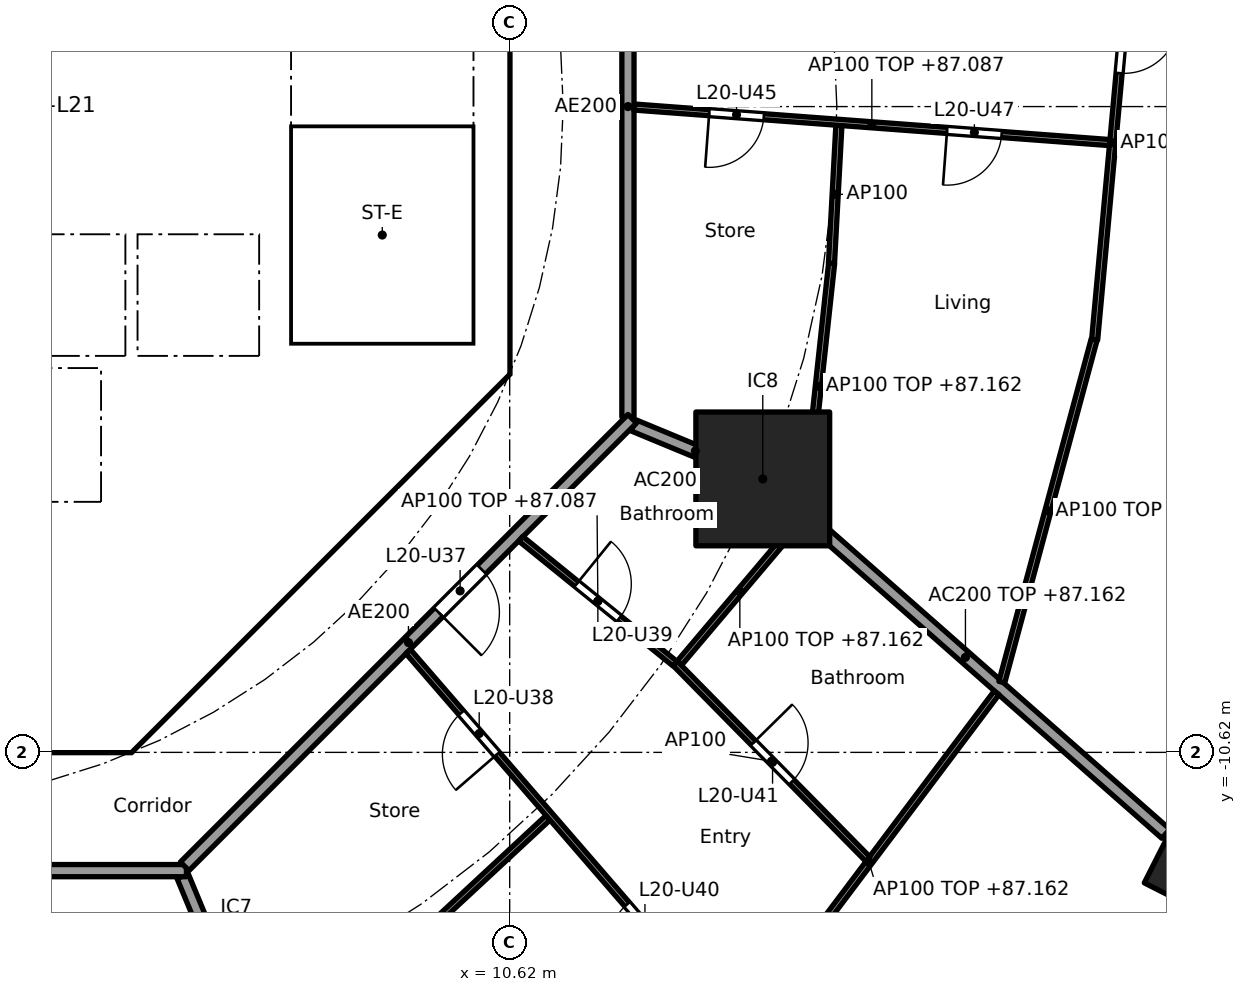
"""IFC4 building model, lengths in metres.
Left out: names, types, materials, properties, quantities, classifications, styles, units other than length and angle.
Written with IfcOpenShell. Run it as: python <this file> out.ifc"""

import sys

from ifc_helpers import new_model, si_unit, direction, frame, frame_2d, origin, origin_2d, place, context, subcontext, project, spatial, polyline, rectangle, hollow_rectangle, outline, extrude, element, fill, save


model = new_model("IFC4")
c1 = context("Model", 3, precision=1e-05, world=origin(), true_north=direction((0.0, 1.0)))
c2 = subcontext(c1, "Body", "Model", "MODEL_VIEW")
j1 = project(units=[si_unit("LENGTHUNIT", "METRE"), si_unit("PLANEANGLEUNIT", "RADIAN")], contexts=[c1])
p1 = place(None, origin())
s1 = spatial("IfcSite", under=j1, at=p1, CompositionType="ELEMENT")
p2 = place(p1, origin())
s2 = spatial("IfcBuilding", under=s1, at=p2, CompositionType="ELEMENT")
p3 = place(p2, frame((0.0, 0.0, 84.4)))
s3 = spatial("IfcBuildingStorey", under=s2, at=p3, CompositionType="ELEMENT", Elevation=84.4)
p4 = place(p3, frame((21.751, -12.39, 0.0), z_axis=(0.0, 0.0, 1.0), x_axis=(0.452462697578, 0.891783329795, 0.0)))
e1 = element("IfcColumn", 1, at=p4, inside=s3, PredefinedType="COLUMN", context=c2, shape_type="SweptSolid", body=[
    extrude(hollow_rectangle(XDim=1.3, YDim=0.9, WallThickness=0.045, at=origin_2d()), origin(), (0.0, 0.0, 1.0), 3.7),
])
p5 = place(p3, frame((14.782, -6.123, 0.0), z_axis=(0.0, 0.0, 1.0), x_axis=(1.0, 0.0, 0.0)))
e2 = element("IfcColumn", 2, at=p5, inside=s3, PredefinedType="COLUMN", context=c2, shape_type="SweptSolid", body=[
    extrude(rectangle(XDim=2.2, YDim=2.2, at=origin_2d()), origin(), (0.0, 0.0, 1.0), 3.7),
])
p6 = place(p3, frame((21.748, -13.137, 0.0), z_axis=(0.0, 0.0, 1.0), x_axis=(-0.506297921217, -0.862358634775, 0.0)))
e3 = element("IfcWall", 3, at=p6, inside=s3, PredefinedType="SOLIDWALL", context=c2, shape_type="SweptSolid", body=[
    extrude(rectangle(XDim=3.325, YDim=0.25, at=frame_2d((1.662, 0.0))), origin(), (0.0, 0.0, 1.0), 3.44),
])
p7 = place(p6, frame((0.612, 0.0, 0.0)))
e4 = element("IfcOpeningElement", 4, at=p7, cuts=e3, PredefinedType="OPENING", context=c2, shape_type="SweptSolid", body=[
    extrude(rectangle(XDim=2.1, YDim=2.4, at=frame_2d((1.05, 1.2))), frame((0.0, 0.135, 0.0), z_axis=(0.0, -1.0, 0.0), x_axis=(1.0, 0.0, 0.0)), (0.0, 0.0, 1.0), 0.27),
])
p8 = place(p3, frame((4.613, -9.988, 0.0), z_axis=(0.0, 0.0, 1.0), x_axis=(0.707106781187, 0.707106781187, 0.0)))
e5 = element("IfcWall", 5, at=p8, inside=s3, PredefinedType="SHEAR", context=c2, shape_type="SweptSolid", body=[
    extrude(rectangle(XDim=7.602, YDim=0.6, at=frame_2d((3.801, 0.0))), origin(), (0.0, 0.0, 1.0), 3.44),
])
p9 = place(p8, frame((3.201, 0.0, 0.0)))
e6 = element("IfcOpeningElement", 6, at=p9, cuts=e5, PredefinedType="OPENING", context=c2, shape_type="SweptSolid", body=[
    extrude(rectangle(XDim=1.2, YDim=2.1, at=frame_2d((0.6, 1.05))), frame((0.0, 0.31, 0.0), z_axis=(0.0, -1.0, 0.0), x_axis=(1.0, 0.0, 0.0)), (0.0, 0.0, 1.0), 0.62),
])
p10 = place(p3, frame((4.0, -10.025, 0.0), z_axis=(0.0, 0.0, 1.0), x_axis=(0.0, 1.0, 0.0)))
e7 = element("IfcWall", 7, at=p10, inside=s3, PredefinedType="SOLIDWALL", context=c2, shape_type="SweptSolid", body=[
    extrude(rectangle(XDim=3.0, YDim=0.2, at=frame_2d((1.5, 0.0))), origin(), (0.0, 0.0, 1.0), 3.44),
])
p11 = place(p10, frame((0.975, 0.0, 0.0)))
e8 = element("IfcOpeningElement", 8, at=p11, cuts=e7, PredefinedType="OPENING", context=c2, shape_type="SweptSolid", body=[
    extrude(rectangle(XDim=1.1, YDim=2.1, at=frame_2d((0.55, 1.05))), frame((0.0, 0.11, 0.0), z_axis=(0.0, -1.0, 0.0), x_axis=(1.0, 0.0, 0.0)), (0.0, 0.0, 1.0), 0.22),
])
p12 = place(p3, frame((4.0, -6.5, 0.0), z_axis=(0.0, 0.0, 1.0), x_axis=(0.0, 1.0, 0.0)))
e9 = element("IfcWall", 9, at=p12, inside=s3, PredefinedType="SOLIDWALL", context=c2, shape_type="SweptSolid", body=[
    extrude(rectangle(XDim=2.2, YDim=0.2, at=frame_2d((1.1, 0.0))), origin(), (0.0, 0.0, 1.0), 3.44),
])
p13 = place(p12, frame((0.55, 0.0, 0.0)))
e10 = element("IfcOpeningElement", 10, at=p13, cuts=e9, PredefinedType="OPENING", context=c2, shape_type="SweptSolid", body=[
    extrude(rectangle(XDim=1.1, YDim=2.1, at=frame_2d((0.55, 1.05))), frame((0.0, 0.11, 0.0), z_axis=(0.0, -1.0, 0.0), x_axis=(1.0, 0.0, 0.0)), (0.0, 0.0, 1.0), 0.22),
])
p14 = place(p3, frame((-6.7, -2.0, 0.0), z_axis=(0.0, 0.0, 1.0), x_axis=(1.0, 0.0, 0.0)))
e11 = element("IfcWall", 11, at=p14, inside=s3, PredefinedType="SOLIDWALL", context=c2, shape_type="SweptSolid", body=[
    extrude(rectangle(XDim=13.4, YDim=0.2, at=frame_2d((6.7, 0.0))), origin(), (0.0, 0.0, 1.0), 3.44),
])
p15 = place(p14, frame((0.65, 0.0, 0.0)))
e12 = element("IfcOpeningElement", 12, at=p15, cuts=e11, PredefinedType="OPENING", context=c2, shape_type="SweptSolid", body=[
    extrude(rectangle(XDim=1.1, YDim=2.1, at=frame_2d((0.55, 1.05))), frame((0.0, 0.11, 0.0), z_axis=(0.0, -1.0, 0.0), x_axis=(1.0, 0.0, 0.0)), (0.0, 0.0, 1.0), 0.22),
])
p16 = place(p14, frame((2.85, 0.0, 0.0)))
e13 = element("IfcOpeningElement", 13, at=p16, cuts=e11, PredefinedType="OPENING", context=c2, shape_type="SweptSolid", body=[
    extrude(rectangle(XDim=1.1, YDim=2.1, at=frame_2d((0.55, 1.05))), frame((0.0, 0.11, 0.0), z_axis=(0.0, -1.0, 0.0), x_axis=(1.0, 0.0, 0.0)), (0.0, 0.0, 1.0), 0.22),
])
p17 = place(p3, origin())
e14 = element("IfcWall", 14, at=p17, inside=s3, PredefinedType="SHEAR", context=c2, shape_type="SweptSolid", body=[
    extrude(outline(polyline([(-4.152, -10.025), (4.152, -10.025), (4.401, -9.776), (4.825, -10.2), (4.401, -10.625), (-4.401, -10.625), (-4.825, -10.2), (-4.401, -9.776), (-4.152, -10.025)])), origin(), (0.0, 0.0, 1.0), 3.44),
])
p18 = place(p3, origin())
e15 = element("IfcWall", 15, at=p18, inside=s3, PredefinedType="SHEAR", context=c2, shape_type="SweptSolid", body=[
    extrude(outline(polyline([(9.776, -4.401), (10.025, -4.152), (10.025, -3.801), (10.025, 4.152), (9.776, 4.401), (10.2, 4.825), (10.625, 4.401), (10.625, -4.401), (10.2, -4.825), (9.776, -4.401)])), origin(), (0.0, 0.0, 1.0), 3.44),
])
p19 = place(p3, origin())
e16 = element("IfcWall", 16, at=p19, inside=s3, PredefinedType="SOLIDWALL", context=c2, shape_type="SweptSolid", body=[
    extrude(outline(polyline([(-6.7, -2.1), (-6.5, -2.1), (-6.5, -4.1), (-4.5, -4.1), (-4.5, -2.1), (-4.3, -2.1), (-4.3, -4.1), (-2.3, -4.1), (-2.3, -2.1), (-2.1, -2.1), (-2.1, -4.1), (-0.1, -4.1), (-0.1, -2.1), (0.1, -2.1), (0.1, -4.1), (2.1, -4.1), (2.1, -2.1), (2.3, -2.1), (2.3, -4.1), (4.3, -4.1), (4.3, -2.1), (4.5, -2.1), (4.5, -4.1), (6.5, -4.1), (6.5, -2.1), (6.7, -2.1), (6.7, -4.3), (-6.7, -4.3), (-6.7, -2.1)])), origin(), (0.0, 0.0, 1.0), 3.44),
])
p20 = place(p3, origin())
e17 = element("IfcWall", 17, at=p20, inside=s3, PredefinedType="SOLIDWALL", context=c2, shape_type="SweptSolid", body=[
    extrude(outline(polyline([(4.1, -7.025), (-4.1, -7.025), (-4.1, -6.5), (4.1, -6.5), (4.1, -7.025)])), origin(), (0.0, 0.0, 1.0), 3.44),
])
p21 = place(p3, origin())
e18 = element("IfcWall", 18, at=p21, inside=s3, PredefinedType="SOLIDWALL", context=c2, shape_type="SweptSolid", body=[
    extrude(outline(polyline([(7.025, -3.9), (6.7, -3.9), (6.7, 3.9), (7.025, 3.9), (7.025, -3.9)])), origin(), (0.0, 0.0, 1.0), 3.44),
])
p22 = place(p3, origin())
e19 = element("IfcWall", 19, at=p22, inside=s3, PredefinedType="SOLIDWALL", context=c2, shape_type="SweptSolid", body=[
    extrude(outline(polyline([(10.025, -4.1), (6.7, -4.1), (6.7, -3.9), (10.025, -3.9), (10.025, -4.1)])), origin(), (0.0, 0.0, 1.0), 3.44),
])
p23 = place(p3, frame((5.243, -12.657, 0.0), z_axis=(0.0, 0.0, 1.0), x_axis=(0.382747093259, -0.923853160736, 0.0)))
e20 = element("IfcWall", 20, at=p23, inside=s3, PredefinedType="PARTITIONING", context=c2, shape_type="SweptSolid", body=[
    extrude(rectangle(XDim=2.2, YDim=0.2, at=frame_2d((1.1, 0.0))), origin(), (0.0, 0.0, 1.0), 3.44),
])
p24 = place(p3, frame((12.657, -5.243, 0.0), z_axis=(0.0, 0.0, 1.0), x_axis=(0.923876145736, -0.382691608661, 0.0)))
e21 = element("IfcWall", 21, at=p24, inside=s3, PredefinedType="PARTITIONING", context=c2, shape_type="SweptSolid", body=[
    extrude(rectangle(XDim=2.2, YDim=0.2, at=frame_2d((1.1, 0.0))), origin(), (0.0, 0.0, 1.0), 3.44),
])
p25 = place(p3, frame((14.82, -6.156, 0.0), z_axis=(0.0, 0.0, 1.0), x_axis=(0.750582231659, -0.660777052808, 0.0)))
e22 = element("IfcWall", 22, at=p25, inside=s3, PredefinedType="PARTITIONING", context=c2, shape_type="SweptSolid", body=[
    extrude(rectangle(XDim=8.781, YDim=0.2, at=frame_2d((4.391, 0.0))), origin(), (0.0, 0.0, 1.0), 2.762),
])
p26 = place(p3, frame((12.565, -5.104, 0.0), z_axis=(0.0, 0.0, 1.0), x_axis=(0.0, 1.0, 0.0)))
e23 = element("IfcWall", 23, at=p26, inside=s3, PredefinedType="PARTITIONING", context=c2, shape_type="SweptSolid", body=[
    extrude(rectangle(XDim=10.209, YDim=0.2, at=frame_2d((5.104, 0.0))), origin(), (0.0, 0.0, 1.0), 3.44),
])
p27 = place(p26, frame((6.339, 0.0, 0.0)))
e24 = element("IfcOpeningElement", 24, at=p27, cuts=e23, PredefinedType="OPENING", context=c2, shape_type="SweptSolid", body=[
    extrude(rectangle(XDim=1.0, YDim=2.1, at=frame_2d((0.5, 1.05))), frame((0.0, 0.11, 0.0), z_axis=(0.0, -1.0, 0.0), x_axis=(1.0, 0.0, 0.0)), (0.0, 0.0, 1.0), 0.22),
])
p28 = place(p3, frame((-5.104, -12.565, 0.0), z_axis=(0.0, 0.0, 1.0), x_axis=(1.0, 0.0, 0.0)))
e25 = element("IfcWall", 25, at=p28, inside=s3, PredefinedType="PARTITIONING", context=c2, shape_type="SweptSolid", body=[
    extrude(rectangle(XDim=10.409, YDim=0.2, at=frame_2d((5.205, 0.0))), origin(), (0.0, 0.0, 1.0), 3.44),
])
p29 = place(p3, frame((5.275, -12.494, 0.0), z_axis=(0.0, 0.0, 1.0), x_axis=(0.707106781187, 0.707106781187, 0.0)))
e26 = element("IfcWall", 26, at=p29, inside=s3, PredefinedType="PARTITIONING", context=c2, shape_type="SweptSolid", body=[
    extrude(rectangle(XDim=10.409, YDim=0.2, at=frame_2d((5.205, 0.0))), origin(), (0.0, 0.0, 1.0), 3.44),
])
p30 = place(p29, frame((5.906, 0.0, 0.0)))
e27 = element("IfcOpeningElement", 27, at=p30, cuts=e26, PredefinedType="OPENING", context=c2, shape_type="SweptSolid", body=[
    extrude(rectangle(XDim=1.0, YDim=2.1, at=frame_2d((0.5, 1.05))), frame((0.0, 0.11, 0.0), z_axis=(0.0, -1.0, 0.0), x_axis=(1.0, 0.0, 0.0)), (0.0, 0.0, 1.0), 0.22),
])
p31 = place(p3, frame((20.834, 2.642, 0.0), z_axis=(0.0, 0.0, 1.0), x_axis=(-0.091385407685, -0.995815599025, 0.0)))
e28 = element("IfcWall", 28, at=p31, inside=s3, PredefinedType="PARTITIONING", context=c2, shape_type="SweptSolid", body=[
    extrude(rectangle(XDim=6.502, YDim=0.1, at=frame_2d((3.251, 0.0))), origin(), (0.0, 0.0, 1.0), 2.762),
])
p32 = place(p31, frame((1.201, 0.0, 0.0)))
e29 = element("IfcOpeningElement", 29, at=p32, cuts=e28, PredefinedType="OPENING", context=c2, shape_type="SweptSolid", body=[
    extrude(rectangle(XDim=0.9, YDim=2.1, at=frame_2d((0.45, 1.05))), frame((0.0, 0.06, 0.0), z_axis=(0.0, -1.0, 0.0), x_axis=(1.0, 0.0, 0.0)), (0.0, 0.0, 1.0), 0.12),
])
p33 = place(p3, frame((6.861, -15.768, 0.0), z_axis=(0.0, 0.0, 1.0), x_axis=(0.733011256509, 0.680216508056, 0.0)))
e30 = element("IfcWall", 30, at=p33, inside=s3, PredefinedType="PARTITIONING", context=c2, shape_type="SweptSolid", body=[
    extrude(rectangle(XDim=5.989, YDim=0.1, at=frame_2d((2.994, 0.0))), origin(), (0.0, 0.0, 1.0), 2.762),
])
p34 = place(p3, frame((8.95, -8.96, 0.0), z_axis=(0.0, 0.0, 1.0), x_axis=(0.65441081073, -0.756139200676, 0.0)))
e31 = element("IfcWall", 31, at=p34, inside=s3, PredefinedType="PARTITIONING", context=c2, shape_type="SweptSolid", body=[
    extrude(rectangle(XDim=12.451, YDim=0.1, at=frame_2d((6.226, 0.0))), origin(), (0.0, 0.0, 1.0), 2.687),
])
p35 = place(p34, frame((1.336, 0.0, 0.0)))
e32 = element("IfcOpeningElement", 32, at=p35, cuts=e31, PredefinedType="OPENING", context=c2, shape_type="SweptSolid", body=[
    extrude(rectangle(XDim=0.9, YDim=2.1, at=frame_2d((0.45, 1.05))), frame((0.0, 0.06, 0.0), z_axis=(0.0, -1.0, 0.0), x_axis=(1.0, 0.0, 0.0)), (0.0, 0.0, 1.0), 0.12),
])
p36 = place(p34, frame((5.501, 0.0, 0.0)))
e33 = element("IfcOpeningElement", 33, at=p36, cuts=e31, PredefinedType="OPENING", context=c2, shape_type="SweptSolid", body=[
    extrude(rectangle(XDim=0.9, YDim=2.1, at=frame_2d((0.45, 1.05))), frame((0.0, 0.06, 0.0), z_axis=(0.0, -1.0, 0.0), x_axis=(1.0, 0.0, 0.0)), (0.0, 0.0, 1.0), 0.12),
])
p37 = place(p34, frame((9.941, 0.0, 0.0)))
e34 = element("IfcOpeningElement", 34, at=p37, cuts=e31, PredefinedType="OPENING", context=c2, shape_type="SweptSolid", body=[
    extrude(rectangle(XDim=0.9, YDim=2.1, at=frame_2d((0.45, 1.05))), frame((0.0, 0.06, 0.0), z_axis=(0.0, -1.0, 0.0), x_axis=(1.0, 0.0, 0.0)), (0.0, 0.0, 1.0), 0.12),
])
p38 = place(p3, frame((14.432, -15.219, 0.0), z_axis=(0.0, 0.0, 1.0), x_axis=(0.601001256685, 0.799248077548, 0.0)))
e35 = element("IfcWall", 35, at=p38, inside=s3, PredefinedType="PARTITIONING", context=c2, shape_type="SweptSolid", body=[
    extrude(rectangle(XDim=6.98, YDim=0.1, at=frame_2d((3.49, 0.0))), origin(), (0.0, 0.0, 1.0), 2.762),
])
p39 = place(p3, frame((10.802, -7.107, 0.0), z_axis=(0.0, 0.0, 1.0), x_axis=(0.776992142502, -0.62951029419, 0.0)))
e36 = element("IfcWall", 36, at=p39, inside=s3, PredefinedType="PARTITIONING", context=c2, shape_type="SweptSolid", body=[
    extrude(rectangle(XDim=3.263, YDim=0.1, at=frame_2d((1.631, 0.0))), origin(), (0.0, 0.0, 1.0), 2.687),
])
p40 = place(p39, frame((1.181, 0.0, 0.0)))
e37 = element("IfcOpeningElement", 37, at=p40, cuts=e36, PredefinedType="OPENING", context=c2, shape_type="SweptSolid", body=[
    extrude(rectangle(XDim=0.9, YDim=2.1, at=frame_2d((0.45, 1.05))), frame((0.0, 0.06, 0.0), z_axis=(0.0, -1.0, 0.0), x_axis=(1.0, 0.0, 0.0)), (0.0, 0.0, 1.0), 0.12),
])
p41 = place(p3, frame((13.341, -9.157, 0.0), z_axis=(0.0, 0.0, 1.0), x_axis=(0.701624526877, -0.712546856904, 0.0)))
e38 = element("IfcWall", 38, at=p41, inside=s3, PredefinedType="PARTITIONING", context=c2, shape_type="SweptSolid", body=[
    extrude(rectangle(XDim=4.515, YDim=0.1, at=frame_2d((2.258, 0.0))), origin(), (0.0, 0.0, 1.0), 3.44),
])
p42 = place(p41, frame((1.833, 0.0, 0.0)))
e39 = element("IfcOpeningElement", 39, at=p42, cuts=e38, PredefinedType="OPENING", context=c2, shape_type="SweptSolid", body=[
    extrude(rectangle(XDim=0.9, YDim=2.1, at=frame_2d((0.45, 1.05))), frame((0.0, 0.06, 0.0), z_axis=(0.0, -1.0, 0.0), x_axis=(1.0, 0.0, 0.0)), (0.0, 0.0, 1.0), 0.12),
])
p43 = place(p3, frame((13.409, -9.155, 0.0), z_axis=(0.0, 0.0, 1.0), x_axis=(0.646130325831, 0.763227097293, 0.0)))
e40 = element("IfcWall", 40, at=p43, inside=s3, PredefinedType="PARTITIONING", context=c2, shape_type="SweptSolid", body=[
    extrude(rectangle(XDim=3.084, YDim=0.1, at=frame_2d((1.542, 0.0))), origin(), (0.0, 0.0, 1.0), 2.762),
])
p44 = place(p3, frame((15.477, -6.625, 0.0), z_axis=(0.0, 0.0, 1.0), x_axis=(0.107561928907, 0.994198386365, 0.0)))
e41 = element("IfcWall", 41, at=p44, inside=s3, PredefinedType="PARTITIONING", context=c2, shape_type="SweptSolid", body=[
    extrude(rectangle(XDim=4.072, YDim=0.1, at=frame_2d((2.036, 0.0))), origin(), (0.0, 0.0, 1.0), 2.762),
])
p45 = place(p3, frame((18.713, -9.464, 0.0), z_axis=(0.0, 0.0, 1.0), x_axis=(0.260279646259, 0.965533275316, 0.0)))
e42 = element("IfcWall", 42, at=p45, inside=s3, PredefinedType="PARTITIONING", context=c2, shape_type="SweptSolid", body=[
    extrude(rectangle(XDim=5.833, YDim=0.1, at=frame_2d((2.917, 0.0))), origin(), (0.0, 0.0, 1.0), 2.762),
])
p46 = place(p3, frame((15.912, -2.577, 0.0), z_axis=(0.0, 0.0, 1.0), x_axis=(0.053749298185, 0.998554461682, 0.0)))
e43 = element("IfcWall", 43, at=p46, inside=s3, PredefinedType="PARTITIONING", context=c2, shape_type="SweptSolid", body=[
    extrude(rectangle(XDim=2.271, YDim=0.1, at=frame_2d((1.135, 0.0))), origin(), (0.0, 0.0, 1.0), 3.44),
])
p47 = place(p3, frame((12.665, -0.008, 0.0), z_axis=(0.0, 0.0, 1.0), x_axis=(0.997222647159, -0.074478130978, 0.0)))
e44 = element("IfcWall", 44, at=p47, inside=s3, PredefinedType="PARTITIONING", context=c2, shape_type="SweptSolid", body=[
    extrude(rectangle(XDim=7.844, YDim=0.1, at=frame_2d((3.922, 0.0))), origin(), (0.0, 0.0, 1.0), 2.687),
])
p48 = place(p47, frame((1.241, 0.0, 0.0)))
e45 = element("IfcOpeningElement", 45, at=p48, cuts=e44, PredefinedType="OPENING", context=c2, shape_type="SweptSolid", body=[
    extrude(rectangle(XDim=0.9, YDim=2.1, at=frame_2d((0.45, 1.05))), frame((0.0, 0.06, 0.0), z_axis=(0.0, -1.0, 0.0), x_axis=(1.0, 0.0, 0.0)), (0.0, 0.0, 1.0), 0.12),
])
p49 = place(p47, frame((5.163, 0.0, 0.0)))
e46 = element("IfcOpeningElement", 46, at=p49, cuts=e44, PredefinedType="OPENING", context=c2, shape_type="SweptSolid", body=[
    extrude(rectangle(XDim=0.9, YDim=2.1, at=frame_2d((0.45, 1.05))), frame((0.0, 0.06, 0.0), z_axis=(0.0, -1.0, 0.0), x_axis=(1.0, 0.0, 0.0)), (0.0, 0.0, 1.0), 0.12),
])
p50 = place(p13, origin())
e47 = element("IfcDoor", 47, at=p50, inside=s3, OperationType="DOUBLE_DOOR_SLIDING", PredefinedType="DOOR", context=c2, shape_type="SweptSolid", body=[
    extrude(rectangle(XDim=1.1, YDim=2.1, at=frame_2d((0.55, 1.05))), frame((0.0, 0.025, 0.0), z_axis=(0.0, -1.0, 0.0), x_axis=(1.0, 0.0, 0.0)), (0.0, 0.0, 1.0), 0.05),
])
fill(e10, e47)
p51 = place(p11, origin())
e48 = element("IfcDoor", 48, at=p51, inside=s3, OperationType="SINGLE_SWING_LEFT", PredefinedType="DOOR", context=c2, shape_type="SweptSolid", body=[
    extrude(rectangle(XDim=1.1, YDim=2.1, at=frame_2d((0.55, 1.05))), frame((0.0, 0.025, 0.0), z_axis=(0.0, -1.0, 0.0), x_axis=(1.0, 0.0, 0.0)), (0.0, 0.0, 1.0), 0.05),
])
fill(e8, e48)
p52 = place(p9, origin())
e49 = element("IfcDoor", 49, at=p52, inside=s3, OperationType="SINGLE_SWING_LEFT", PredefinedType="DOOR", context=c2, shape_type="SweptSolid", body=[
    extrude(rectangle(XDim=1.2, YDim=2.1, at=frame_2d((0.6, 1.05))), frame((0.0, 0.025, 0.0), z_axis=(0.0, -1.0, 0.0), x_axis=(1.0, 0.0, 0.0)), (0.0, 0.0, 1.0), 0.05),
])
fill(e6, e49)
p53 = place(p30, frame((1.0, 0.0, 0.0), x_axis=(-1.0, 0.0, 0.0)))
e50 = element("IfcDoor", 50, at=p53, inside=s3, OperationType="SINGLE_SWING_RIGHT", PredefinedType="DOOR", context=c2, shape_type="SweptSolid", body=[
    extrude(rectangle(XDim=1.0, YDim=2.1, at=frame_2d((0.5, 1.05))), frame((0.0, 0.025, 0.0), z_axis=(0.0, -1.0, 0.0), x_axis=(1.0, 0.0, 0.0)), (0.0, 0.0, 1.0), 0.05),
])
fill(e27, e50)
p54 = place(p35, frame((0.9, 0.0, 0.0), x_axis=(-1.0, 0.0, 0.0)))
e51 = element("IfcDoor", 51, at=p54, inside=s3, OperationType="SINGLE_SWING_LEFT", PredefinedType="DOOR", context=c2, shape_type="SweptSolid", body=[
    extrude(rectangle(XDim=0.9, YDim=2.1, at=frame_2d((0.45, 1.05))), frame((0.0, 0.025, 0.0), z_axis=(0.0, -1.0, 0.0), x_axis=(1.0, 0.0, 0.0)), (0.0, 0.0, 1.0), 0.05),
])
fill(e32, e51)
p55 = place(p40, origin())
e52 = element("IfcDoor", 52, at=p55, inside=s3, OperationType="SINGLE_SWING_LEFT", PredefinedType="DOOR", context=c2, shape_type="SweptSolid", body=[
    extrude(rectangle(XDim=0.9, YDim=2.1, at=frame_2d((0.45, 1.05))), frame((0.0, 0.025, 0.0), z_axis=(0.0, -1.0, 0.0), x_axis=(1.0, 0.0, 0.0)), (0.0, 0.0, 1.0), 0.05),
])
fill(e37, e52)
p56 = place(p36, frame((0.9, 0.0, 0.0), x_axis=(-1.0, 0.0, 0.0)))
e53 = element("IfcDoor", 53, at=p56, inside=s3, OperationType="SINGLE_SWING_LEFT", PredefinedType="DOOR", context=c2, shape_type="SweptSolid", body=[
    extrude(rectangle(XDim=0.9, YDim=2.1, at=frame_2d((0.45, 1.05))), frame((0.0, 0.025, 0.0), z_axis=(0.0, -1.0, 0.0), x_axis=(1.0, 0.0, 0.0)), (0.0, 0.0, 1.0), 0.05),
])
fill(e33, e53)
p57 = place(p42, origin())
e54 = element("IfcDoor", 54, at=p57, inside=s3, OperationType="SINGLE_SWING_LEFT", PredefinedType="DOOR", context=c2, shape_type="SweptSolid", body=[
    extrude(rectangle(XDim=0.9, YDim=2.1, at=frame_2d((0.45, 1.05))), frame((0.0, 0.025, 0.0), z_axis=(0.0, -1.0, 0.0), x_axis=(1.0, 0.0, 0.0)), (0.0, 0.0, 1.0), 0.05),
])
fill(e39, e54)
p58 = place(p48, frame((0.9, 0.0, 0.0), x_axis=(-1.0, 0.0, 0.0)))
e55 = element("IfcDoor", 55, at=p58, inside=s3, OperationType="SINGLE_SWING_RIGHT", PredefinedType="DOOR", context=c2, shape_type="SweptSolid", body=[
    extrude(rectangle(XDim=0.9, YDim=2.1, at=frame_2d((0.45, 1.05))), frame((0.0, 0.025, 0.0), z_axis=(0.0, -1.0, 0.0), x_axis=(1.0, 0.0, 0.0)), (0.0, 0.0, 1.0), 0.05),
])
fill(e45, e55)
p59 = place(p49, frame((0.9, 0.0, 0.0), x_axis=(-1.0, 0.0, 0.0)))
e56 = element("IfcDoor", 56, at=p59, inside=s3, OperationType="SINGLE_SWING_RIGHT", PredefinedType="DOOR", context=c2, shape_type="SweptSolid", body=[
    extrude(rectangle(XDim=0.9, YDim=2.1, at=frame_2d((0.45, 1.05))), frame((0.0, 0.025, 0.0), z_axis=(0.0, -1.0, 0.0), x_axis=(1.0, 0.0, 0.0)), (0.0, 0.0, 1.0), 0.05),
])
fill(e46, e56)
p60 = place(p32, origin())
e57 = element("IfcDoor", 57, at=p60, inside=s3, OperationType="SINGLE_SWING_LEFT", PredefinedType="DOOR", context=c2, shape_type="SweptSolid", body=[
    extrude(rectangle(XDim=0.9, YDim=2.1, at=frame_2d((0.45, 1.05))), frame((0.0, 0.025, 0.0), z_axis=(0.0, -1.0, 0.0), x_axis=(1.0, 0.0, 0.0)), (0.0, 0.0, 1.0), 0.05),
])
fill(e29, e57)
save(model, sys.argv[1])
